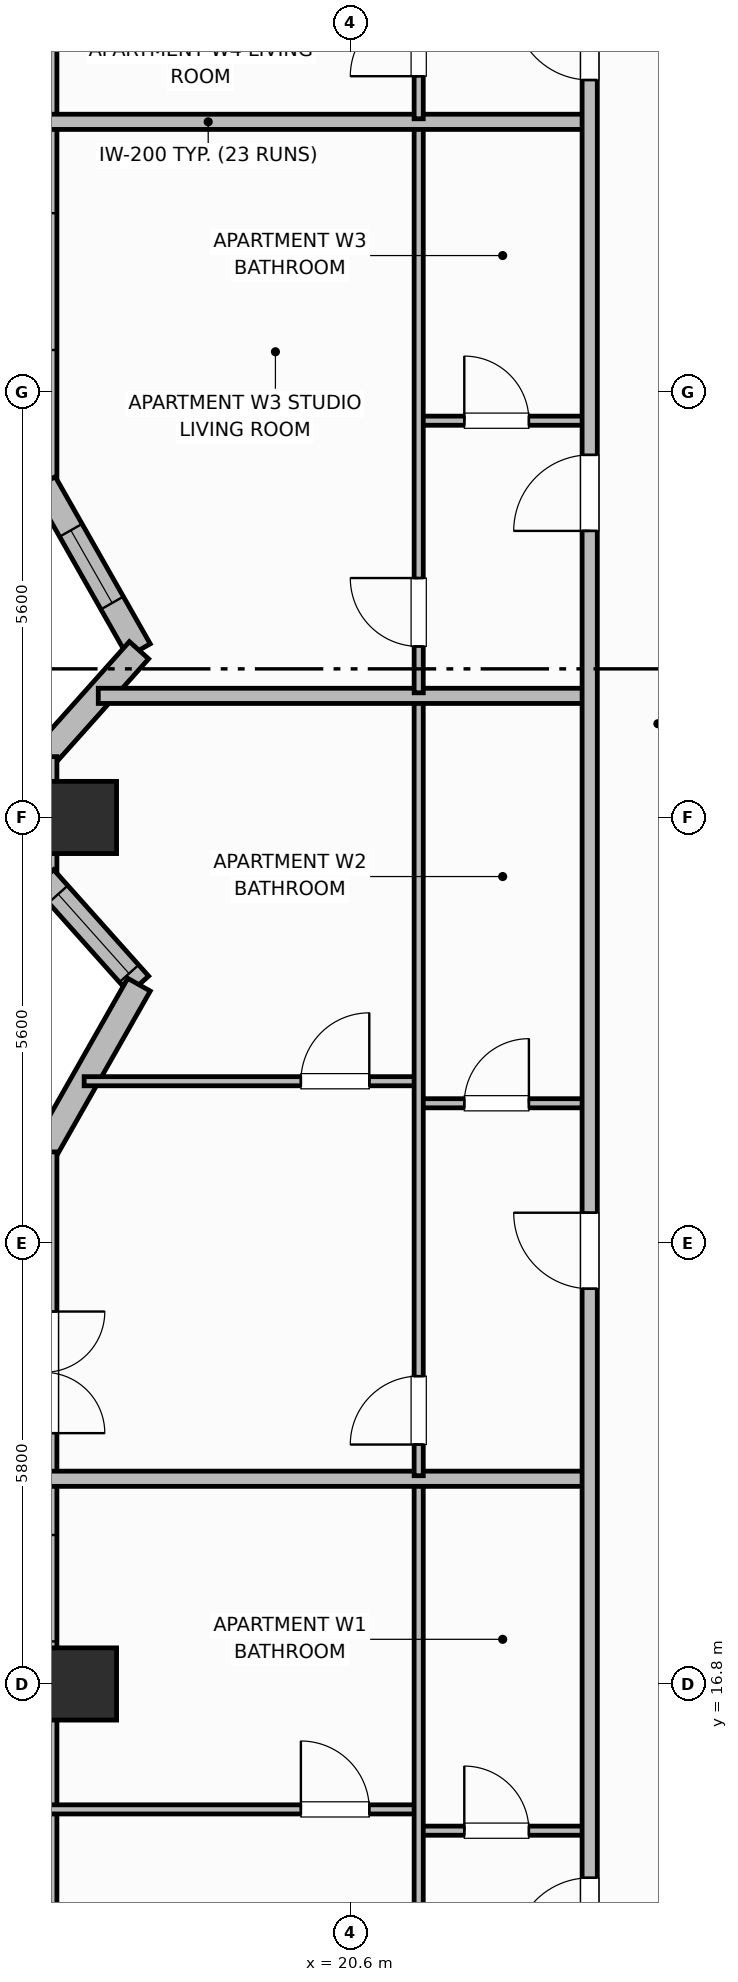
"""IFC4 building model, lengths in metres.
Left out: names, types, materials, properties, quantities, classifications, styles, units other than length and angle.
Written with IfcOpenShell. Run it as: python <this file> out.ifc"""

import sys

from ifc_helpers import new_model, si_unit, direction, frame, frame_2d, origin, origin_2d, place, context, subcontext, project, spatial, rectangle, extrude, element, fill, save


model = new_model("IFC4")
c1 = context("Model", 3, precision=1e-05, world=origin(), true_north=direction((0.0, 1.0)))
c2 = subcontext(c1, "Body", "Model", "MODEL_VIEW")
j1 = project(units=[si_unit("LENGTHUNIT", "METRE"), si_unit("PLANEANGLEUNIT", "RADIAN")], contexts=[c1])
p1 = place(None, origin())
s1 = spatial("IfcSite", under=j1, at=p1, CompositionType="ELEMENT")
p2 = place(p1, origin())
s2 = spatial("IfcBuilding", under=s1, at=p2, CompositionType="ELEMENT")
p3 = place(p2, frame((0.0, 0.0, 166.3)))
s3 = spatial("IfcBuildingStorey", under=s2, at=p3, CompositionType="ELEMENT", Elevation=166.3)
for number, where, z_axis, x_axis in (
    (1, (17.05, 16.8, 0.0), (0.0, 0.0, 1.0), (1.0, 0.0, 0.0)),
    (2, (17.05, 28.2, 0.0), (0.0, 0.0, 1.0), (1.0, 0.0, 0.0)),
):
    element("IfcColumn", number, at=place(p3, frame(where, z_axis=z_axis, x_axis=x_axis)), inside=s3, PredefinedType="COLUMN", context=c2, shape_type="SweptSolid", body=[
        extrude(rectangle(XDim=0.95, YDim=0.95, at=origin_2d()), origin(), (0.0, 0.0, 1.0), 3.7),
    ])
p4 = place(p3, frame((16.57, 45.9, 0.0), z_axis=(0.0, 0.0, 1.0), x_axis=(0.0, -1.0, 0.0)))
e3 = element("IfcWall", 3, at=p4, inside=s3, PredefinedType="SOLIDWALL", context=c2, shape_type="SweptSolid", body=[
    extrude(rectangle(XDim=13.3, YDim=0.34, at=frame_2d((6.65, 0.0))), origin(), (0.0, 0.0, 1.0), 2.72),
])
p5 = place(p4, frame((1.75, 0.0, 0.75)))
e4 = element("IfcOpeningElement", 4, at=p5, cuts=e3, PredefinedType="OPENING", context=c2, shape_type="SweptSolid", body=[
    extrude(rectangle(XDim=1.8, YDim=1.85, at=frame_2d((0.9, 0.925))), frame((0.0, 0.18, 0.0), z_axis=(0.0, -1.0, 0.0), x_axis=(1.0, 0.0, 0.0)), (0.0, 0.0, 1.0), 0.36),
])
p6 = place(p4, frame((9.75, 0.0, 0.75)))
e5 = element("IfcOpeningElement", 5, at=p6, cuts=e3, PredefinedType="OPENING", context=c2, shape_type="SweptSolid", body=[
    extrude(rectangle(XDim=1.8, YDim=1.85, at=frame_2d((0.9, 0.925))), frame((0.0, 0.18, 0.0), z_axis=(0.0, -1.0, 0.0), x_axis=(1.0, 0.0, 0.0)), (0.0, 0.0, 1.0), 0.36),
])
p7 = place(p3, frame((16.57, 32.6, 0.0), z_axis=(0.0, 0.0, 1.0), x_axis=(0.493976255291, -0.869475393101, 0.0)))
e6 = element("IfcWall", 6, at=p7, inside=s3, PredefinedType="SOLIDWALL", context=c2, shape_type="SweptSolid", body=[
    extrude(rectangle(XDim=2.531, YDim=0.34, at=frame_2d((1.265, 0.0))), origin(), (0.0, 0.0, 1.0), 2.72),
])
p8 = place(p7, frame((0.715, 0.0, 0.91)))
e7 = element("IfcOpeningElement", 7, at=p8, cuts=e6, PredefinedType="OPENING", context=c2, shape_type="SweptSolid", body=[
    extrude(rectangle(XDim=1.1, YDim=1.65, at=frame_2d((0.55, 0.825))), frame((0.0, 0.18, 0.0), z_axis=(0.0, -1.0, 0.0), x_axis=(1.0, 0.0, 0.0)), (0.0, 0.0, 1.0), 0.36),
])
p9 = place(p3, frame((17.82, 30.4, 0.0), z_axis=(0.0, 0.0, 1.0), x_axis=(-0.666041619974, -0.74591457987, 0.0)))
e8 = element("IfcWall", 8, at=p9, inside=s3, PredefinedType="SOLIDWALL", context=c2, shape_type="SweptSolid", body=[
    extrude(rectangle(XDim=1.877, YDim=0.34, at=frame_2d((0.938, 0.0))), origin(), (0.0, 0.0, 1.0), 2.72),
])
p10 = place(p3, frame((16.57, 29.0, 0.0), z_axis=(0.0, 0.0, 1.0), x_axis=(0.0, -1.0, 0.0)))
e9 = element("IfcWall", 9, at=p10, inside=s3, PredefinedType="SOLIDWALL", context=c2, shape_type="SweptSolid", body=[
    extrude(rectangle(XDim=1.6, YDim=0.34, at=frame_2d((0.8, 0.0))), origin(), (0.0, 0.0, 1.0), 2.72),
])
p11 = place(p3, frame((16.57, 27.4, 0.0), z_axis=(0.0, 0.0, 1.0), x_axis=(0.666041619974, -0.74591457987, 0.0)))
e10 = element("IfcWall", 10, at=p11, inside=s3, PredefinedType="SOLIDWALL", context=c2, shape_type="SweptSolid", body=[
    extrude(rectangle(XDim=1.877, YDim=0.34, at=frame_2d((0.938, 0.0))), origin(), (0.0, 0.0, 1.0), 2.72),
])
p12 = place(p11, frame((0.28, 0.0, 0.71)))
e11 = element("IfcOpeningElement", 11, at=p12, cuts=e10, PredefinedType="OPENING", context=c2, shape_type="SweptSolid", body=[
    extrude(rectangle(XDim=1.4, YDim=1.85, at=frame_2d((0.7, 0.925))), frame((0.0, 0.18, 0.0), z_axis=(0.0, -1.0, 0.0), x_axis=(1.0, 0.0, 0.0)), (0.0, 0.0, 1.0), 0.36),
])
p13 = place(p3, frame((17.82, 26.0, 0.0), z_axis=(0.0, 0.0, 1.0), x_axis=(-0.494017696272, -0.869451847873, 0.0)))
e12 = element("IfcWall", 12, at=p13, inside=s3, PredefinedType="SOLIDWALL", context=c2, shape_type="SweptSolid", body=[
    extrude(rectangle(XDim=2.53, YDim=0.34, at=frame_2d((1.265, 0.0))), origin(), (0.0, 0.0, 1.0), 2.72),
])
p14 = place(p3, frame((16.57, 23.8, 0.0), z_axis=(0.0, 0.0, 1.0), x_axis=(0.0, -1.0, 0.0)))
e13 = element("IfcWall", 13, at=p14, inside=s3, PredefinedType="SOLIDWALL", context=c2, shape_type="SweptSolid", body=[
    extrude(rectangle(XDim=13.3, YDim=0.34, at=frame_2d((6.65, 0.0))), origin(), (0.0, 0.0, 1.0), 2.72),
])
p15 = place(p14, frame((2.1, 0.0, 0.0)))
e14 = element("IfcOpeningElement", 14, at=p15, cuts=e13, PredefinedType="OPENING", context=c2, shape_type="SweptSolid", body=[
    extrude(rectangle(XDim=1.6, YDim=2.1, at=frame_2d((0.8, 1.05))), frame((0.0, 0.18, 0.0), z_axis=(0.0, -1.0, 0.0), x_axis=(1.0, 0.0, 0.0)), (0.0, 0.0, 1.0), 0.36),
])
p16 = place(p14, frame((5.04, 0.0, 0.71)))
e15 = element("IfcOpeningElement", 15, at=p16, cuts=e13, PredefinedType="OPENING", context=c2, shape_type="SweptSolid", body=[
    extrude(rectangle(XDim=1.4, YDim=1.85, at=frame_2d((0.7, 0.925))), frame((0.0, 0.18, 0.0), z_axis=(0.0, -1.0, 0.0), x_axis=(1.0, 0.0, 0.0)), (0.0, 0.0, 1.0), 0.36),
])
p17 = place(p14, frame((10.35, 0.0, 0.7)))
e16 = element("IfcOpeningElement", 16, at=p17, cuts=e13, PredefinedType="OPENING", context=c2, shape_type="SweptSolid", body=[
    extrude(rectangle(XDim=1.6, YDim=1.9, at=frame_2d((0.8, 0.95))), frame((0.0, 0.18, 0.0), z_axis=(0.0, -1.0, 0.0), x_axis=(1.0, 0.0, 0.0)), (0.0, 0.0, 1.0), 0.36),
])
p18 = place(p3, frame((21.5, 14.87, 0.0), z_axis=(0.0, 0.0, 1.0), x_axis=(1.0, 0.0, 0.0)))
e17 = element("IfcWall", 17, at=p18, inside=s3, PredefinedType="PARTITIONING", context=c2, shape_type="SweptSolid", body=[
    extrude(rectangle(XDim=2.25, YDim=0.12, at=frame_2d((1.125, 0.0))), origin(), (0.0, 0.0, 1.0), 2.55),
])
p19 = place(p18, frame((0.6, 0.0, 0.0)))
e18 = element("IfcOpeningElement", 18, at=p19, cuts=e17, PredefinedType="OPENING", context=c2, shape_type="SweptSolid", body=[
    extrude(rectangle(XDim=0.85, YDim=2.1, at=frame_2d((0.425, 1.05))), frame((0.0, 0.07, 0.0), z_axis=(0.0, -1.0, 0.0), x_axis=(1.0, 0.0, 0.0)), (0.0, 0.0, 1.0), 0.14),
])
p20 = place(p3, frame((16.57, 15.15, 0.0), z_axis=(0.0, 0.0, 1.0), x_axis=(1.0, 0.0, 0.0)))
e19 = element("IfcWall", 19, at=p20, inside=s3, PredefinedType="PARTITIONING", context=c2, shape_type="SweptSolid", body=[
    extrude(rectangle(XDim=4.93, YDim=0.12, at=frame_2d((2.465, 0.0))), origin(), (0.0, 0.0, 1.0), 2.55),
])
p21 = place(p20, frame((3.38, 0.0, 0.0)))
e20 = element("IfcOpeningElement", 20, at=p21, cuts=e19, PredefinedType="OPENING", context=c2, shape_type="SweptSolid", body=[
    extrude(rectangle(XDim=0.9, YDim=2.1, at=frame_2d((0.45, 1.05))), frame((0.0, 0.07, 0.0), z_axis=(0.0, -1.0, 0.0), x_axis=(1.0, 0.0, 0.0)), (0.0, 0.0, 1.0), 0.14),
])
p22 = place(p3, frame((21.5, 10.64, 0.0), z_axis=(0.0, 0.0, 1.0), x_axis=(0.0, 1.0, 0.0)))
e21 = element("IfcWall", 21, at=p22, inside=s3, PredefinedType="PARTITIONING", context=c2, shape_type="SweptSolid", body=[
    extrude(rectangle(XDim=8.82, YDim=0.12, at=frame_2d((4.41, 0.0))), origin(), (0.0, 0.0, 1.0), 2.55),
])
p23 = place(p22, frame((0.41, 0.0, 0.0)))
e22 = element("IfcOpeningElement", 22, at=p23, cuts=e21, PredefinedType="OPENING", context=c2, shape_type="SweptSolid", body=[
    extrude(rectangle(XDim=0.9, YDim=2.1, at=frame_2d((0.45, 1.05))), frame((0.0, 0.07, 0.0), z_axis=(0.0, -1.0, 0.0), x_axis=(1.0, 0.0, 0.0)), (0.0, 0.0, 1.0), 0.14),
])
p24 = place(p3, frame((16.57, 19.5, 0.0), z_axis=(0.0, 0.0, 1.0), x_axis=(1.0, 0.0, 0.0)))
e23 = element("IfcWall", 23, at=p24, inside=s3, PredefinedType="PARTITIONING", context=c2, shape_type="SweptSolid", body=[
    extrude(rectangle(XDim=7.18, YDim=0.2, at=frame_2d((3.59, 0.0))), origin(), (0.0, 0.0, 1.0), 2.55),
])
p25 = place(p3, frame((21.5, 24.44, 0.0), z_axis=(0.0, 0.0, 1.0), x_axis=(1.0, 0.0, 0.0)))
e24 = element("IfcWall", 24, at=p25, inside=s3, PredefinedType="PARTITIONING", context=c2, shape_type="SweptSolid", body=[
    extrude(rectangle(XDim=2.25, YDim=0.12, at=frame_2d((1.125, 0.0))), origin(), (0.0, 0.0, 1.0), 2.55),
])
p26 = place(p25, frame((0.6, 0.0, 0.0)))
e25 = element("IfcOpeningElement", 25, at=p26, cuts=e24, PredefinedType="OPENING", context=c2, shape_type="SweptSolid", body=[
    extrude(rectangle(XDim=0.85, YDim=2.1, at=frame_2d((0.425, 1.05))), frame((0.0, 0.07, 0.0), z_axis=(0.0, -1.0, 0.0), x_axis=(1.0, 0.0, 0.0)), (0.0, 0.0, 1.0), 0.14),
])
p27 = place(p3, frame((17.098, 24.73, 0.0), z_axis=(0.0, 0.0, 1.0), x_axis=(1.0, 0.0, 0.0)))
e26 = element("IfcWall", 26, at=p27, inside=s3, PredefinedType="PARTITIONING", context=c2, shape_type="SweptSolid", body=[
    extrude(rectangle(XDim=4.402, YDim=0.12, at=frame_2d((2.201, 0.0))), origin(), (0.0, 0.0, 1.0), 2.55),
])
p28 = place(p27, frame((2.852, 0.0, 0.0)))
e27 = element("IfcOpeningElement", 27, at=p28, cuts=e26, PredefinedType="OPENING", context=c2, shape_type="SweptSolid", body=[
    extrude(rectangle(XDim=0.9, YDim=2.1, at=frame_2d((0.45, 1.05))), frame((0.0, 0.07, 0.0), z_axis=(0.0, -1.0, 0.0), x_axis=(1.0, 0.0, 0.0)), (0.0, 0.0, 1.0), 0.14),
])
p29 = place(p3, frame((21.5, 19.54, 0.0), z_axis=(0.0, 0.0, 1.0), x_axis=(0.0, 1.0, 0.0)))
e28 = element("IfcWall", 28, at=p29, inside=s3, PredefinedType="PARTITIONING", context=c2, shape_type="SweptSolid", body=[
    extrude(rectangle(XDim=10.22, YDim=0.12, at=frame_2d((5.11, 0.0))), origin(), (0.0, 0.0, 1.0), 2.55),
])
p30 = place(p29, frame((0.41, 0.0, 0.0)))
e29 = element("IfcOpeningElement", 29, at=p30, cuts=e28, PredefinedType="OPENING", context=c2, shape_type="SweptSolid", body=[
    extrude(rectangle(XDim=0.9, YDim=2.1, at=frame_2d((0.45, 1.05))), frame((0.0, 0.07, 0.0), z_axis=(0.0, -1.0, 0.0), x_axis=(1.0, 0.0, 0.0)), (0.0, 0.0, 1.0), 0.14),
])
p31 = place(p3, frame((17.284, 29.8, 0.0), z_axis=(0.0, 0.0, 1.0), x_axis=(1.0, 0.0, 0.0)))
e30 = element("IfcWall", 30, at=p31, inside=s3, PredefinedType="PARTITIONING", context=c2, shape_type="SweptSolid", body=[
    extrude(rectangle(XDim=6.466, YDim=0.2, at=frame_2d((3.233, 0.0))), origin(), (0.0, 0.0, 1.0), 2.55),
])
p32 = place(p3, frame((21.5, 33.42, 0.0), z_axis=(0.0, 0.0, 1.0), x_axis=(1.0, 0.0, 0.0)))
e31 = element("IfcWall", 31, at=p32, inside=s3, PredefinedType="PARTITIONING", context=c2, shape_type="SweptSolid", body=[
    extrude(rectangle(XDim=2.25, YDim=0.12, at=frame_2d((1.125, 0.0))), origin(), (0.0, 0.0, 1.0), 2.55),
])
p33 = place(p32, frame((0.6, 0.0, 0.0)))
e32 = element("IfcOpeningElement", 32, at=p33, cuts=e31, PredefinedType="OPENING", context=c2, shape_type="SweptSolid", body=[
    extrude(rectangle(XDim=0.85, YDim=2.1, at=frame_2d((0.425, 1.05))), frame((0.0, 0.07, 0.0), z_axis=(0.0, -1.0, 0.0), x_axis=(1.0, 0.0, 0.0)), (0.0, 0.0, 1.0), 0.14),
])
p34 = place(p3, frame((21.5, 29.84, 0.0), z_axis=(0.0, 0.0, 1.0), x_axis=(0.0, 1.0, 0.0)))
e33 = element("IfcWall", 33, at=p34, inside=s3, PredefinedType="PARTITIONING", context=c2, shape_type="SweptSolid", body=[
    extrude(rectangle(XDim=7.472, YDim=0.12, at=frame_2d((3.736, 0.0))), origin(), (0.0, 0.0, 1.0), 2.55),
])
p35 = place(p34, frame((0.61, 0.0, 0.0)))
e34 = element("IfcOpeningElement", 34, at=p35, cuts=e33, PredefinedType="OPENING", context=c2, shape_type="SweptSolid", body=[
    extrude(rectangle(XDim=0.9, YDim=2.1, at=frame_2d((0.45, 1.05))), frame((0.0, 0.07, 0.0), z_axis=(0.0, -1.0, 0.0), x_axis=(1.0, 0.0, 0.0)), (0.0, 0.0, 1.0), 0.14),
])
p36 = place(p3, frame((16.57, 37.352, 0.0), z_axis=(0.0, 0.0, 1.0), x_axis=(1.0, 0.0, 0.0)))
e35 = element("IfcWall", 35, at=p36, inside=s3, PredefinedType="PARTITIONING", context=c2, shape_type="SweptSolid", body=[
    extrude(rectangle(XDim=7.18, YDim=0.2, at=frame_2d((3.59, 0.0))), origin(), (0.0, 0.0, 1.0), 2.55),
])
p37 = place(p3, frame((21.5, 37.392, 0.0), z_axis=(0.0, 0.0, 1.0), x_axis=(0.0, 1.0, 0.0)))
e36 = element("IfcWall", 36, at=p37, inside=s3, PredefinedType="PARTITIONING", context=c2, shape_type="SweptSolid", body=[
    extrude(rectangle(XDim=8.368, YDim=0.12, at=frame_2d((4.184, 0.0))), origin(), (0.0, 0.0, 1.0), 2.55),
])
p38 = place(p37, frame((0.56, 0.0, 0.0)))
e37 = element("IfcOpeningElement", 37, at=p38, cuts=e36, PredefinedType="OPENING", context=c2, shape_type="SweptSolid", body=[
    extrude(rectangle(XDim=0.9, YDim=2.1, at=frame_2d((0.45, 1.05))), frame((0.0, 0.07, 0.0), z_axis=(0.0, -1.0, 0.0), x_axis=(1.0, 0.0, 0.0)), (0.0, 0.0, 1.0), 0.14),
])
p39 = place(p3, frame((23.75, 10.6, 0.0), z_axis=(0.0, 0.0, 1.0), x_axis=(0.0, 1.0, 0.0)))
e38 = element("IfcWall", 38, at=p39, inside=s3, PredefinedType="PARTITIONING", context=c2, shape_type="SweptSolid", body=[
    extrude(rectangle(XDim=35.2, YDim=0.2, at=frame_2d((17.6, 0.0))), origin(), (0.0, 0.0, 1.0), 2.55),
])
p40 = place(p39, frame((2.65, 0.0, 0.0)))
e39 = element("IfcOpeningElement", 39, at=p40, cuts=e38, PredefinedType="OPENING", context=c2, shape_type="SweptSolid", body=[
    extrude(rectangle(XDim=1.0, YDim=2.15, at=frame_2d((0.5, 1.075))), frame((0.0, 0.11, 0.0), z_axis=(0.0, -1.0, 0.0), x_axis=(1.0, 0.0, 0.0)), (0.0, 0.0, 1.0), 0.22),
])
p41 = place(p39, frame((11.4, 0.0, 0.0)))
e40 = element("IfcOpeningElement", 40, at=p41, cuts=e38, PredefinedType="OPENING", context=c2, shape_type="SweptSolid", body=[
    extrude(rectangle(XDim=1.0, YDim=2.15, at=frame_2d((0.5, 1.075))), frame((0.0, 0.11, 0.0), z_axis=(0.0, -1.0, 0.0), x_axis=(1.0, 0.0, 0.0)), (0.0, 0.0, 1.0), 0.22),
])
p42 = place(p39, frame((21.37, 0.0, 0.0)))
e41 = element("IfcOpeningElement", 41, at=p42, cuts=e38, PredefinedType="OPENING", context=c2, shape_type="SweptSolid", body=[
    extrude(rectangle(XDim=1.0, YDim=2.15, at=frame_2d((0.5, 1.075))), frame((0.0, 0.11, 0.0), z_axis=(0.0, -1.0, 0.0), x_axis=(1.0, 0.0, 0.0)), (0.0, 0.0, 1.0), 0.22),
])
p43 = place(p39, frame((27.302, 0.0, 0.0)))
e42 = element("IfcOpeningElement", 42, at=p43, cuts=e38, PredefinedType="OPENING", context=c2, shape_type="SweptSolid", body=[
    extrude(rectangle(XDim=1.0, YDim=2.15, at=frame_2d((0.5, 1.075))), frame((0.0, 0.11, 0.0), z_axis=(0.0, -1.0, 0.0), x_axis=(1.0, 0.0, 0.0)), (0.0, 0.0, 1.0), 0.22),
])
p44 = place(p8, origin())
e43 = element("IfcWindow", 43, at=p44, inside=s3, PartitioningType="SINGLE_PANEL", PredefinedType="WINDOW", context=c2, shape_type="SweptSolid", body=[
    extrude(rectangle(XDim=1.1, YDim=1.65, at=frame_2d((0.55, 0.825))), frame((0.0, 0.03, 0.0), z_axis=(0.0, -1.0, 0.0), x_axis=(1.0, 0.0, 0.0)), (0.0, 0.0, 1.0), 0.06),
])
fill(e7, e43)
p45 = place(p12, origin())
e44 = element("IfcWindow", 44, at=p45, inside=s3, PartitioningType="SINGLE_PANEL", PredefinedType="WINDOW", context=c2, shape_type="SweptSolid", body=[
    extrude(rectangle(XDim=1.4, YDim=1.85, at=frame_2d((0.7, 0.925))), frame((0.0, 0.03, 0.0), z_axis=(0.0, -1.0, 0.0), x_axis=(1.0, 0.0, 0.0)), (0.0, 0.0, 1.0), 0.06),
])
fill(e11, e44)
p46 = place(p19, origin())
e45 = element("IfcDoor", 45, at=p46, inside=s3, OperationType="SINGLE_SWING_LEFT", PredefinedType="DOOR", context=c2, shape_type="SweptSolid", body=[
    extrude(rectangle(XDim=0.85, YDim=2.1, at=frame_2d((0.425, 1.05))), frame((0.0, 0.025, 0.0), z_axis=(0.0, -1.0, 0.0), x_axis=(1.0, 0.0, 0.0)), (0.0, 0.0, 1.0), 0.05),
])
fill(e18, e45)
p47 = place(p21, origin())
e46 = element("IfcDoor", 46, at=p47, inside=s3, OperationType="SINGLE_SWING_LEFT", PredefinedType="DOOR", context=c2, shape_type="SweptSolid", body=[
    extrude(rectangle(XDim=0.9, YDim=2.1, at=frame_2d((0.45, 1.05))), frame((0.0, 0.025, 0.0), z_axis=(0.0, -1.0, 0.0), x_axis=(1.0, 0.0, 0.0)), (0.0, 0.0, 1.0), 0.05),
])
fill(e20, e46)
p48 = place(p26, origin())
e47 = element("IfcDoor", 47, at=p48, inside=s3, OperationType="SINGLE_SWING_RIGHT", PredefinedType="DOOR", context=c2, shape_type="SweptSolid", body=[
    extrude(rectangle(XDim=0.85, YDim=2.1, at=frame_2d((0.425, 1.05))), frame((0.0, 0.025, 0.0), z_axis=(0.0, -1.0, 0.0), x_axis=(1.0, 0.0, 0.0)), (0.0, 0.0, 1.0), 0.05),
])
fill(e25, e47)
p49 = place(p28, origin())
e48 = element("IfcDoor", 48, at=p49, inside=s3, OperationType="SINGLE_SWING_RIGHT", PredefinedType="DOOR", context=c2, shape_type="SweptSolid", body=[
    extrude(rectangle(XDim=0.9, YDim=2.1, at=frame_2d((0.45, 1.05))), frame((0.0, 0.025, 0.0), z_axis=(0.0, -1.0, 0.0), x_axis=(1.0, 0.0, 0.0)), (0.0, 0.0, 1.0), 0.05),
])
fill(e27, e48)
p50 = place(p30, origin())
e49 = element("IfcDoor", 49, at=p50, inside=s3, OperationType="SINGLE_SWING_LEFT", PredefinedType="DOOR", context=c2, shape_type="SweptSolid", body=[
    extrude(rectangle(XDim=0.9, YDim=2.1, at=frame_2d((0.45, 1.05))), frame((0.0, 0.025, 0.0), z_axis=(0.0, -1.0, 0.0), x_axis=(1.0, 0.0, 0.0)), (0.0, 0.0, 1.0), 0.05),
])
fill(e29, e49)
p51 = place(p33, origin())
e50 = element("IfcDoor", 50, at=p51, inside=s3, OperationType="SINGLE_SWING_LEFT", PredefinedType="DOOR", context=c2, shape_type="SweptSolid", body=[
    extrude(rectangle(XDim=0.85, YDim=2.1, at=frame_2d((0.425, 1.05))), frame((0.0, 0.025, 0.0), z_axis=(0.0, -1.0, 0.0), x_axis=(1.0, 0.0, 0.0)), (0.0, 0.0, 1.0), 0.05),
])
fill(e32, e50)
p52 = place(p35, origin())
e51 = element("IfcDoor", 51, at=p52, inside=s3, OperationType="SINGLE_SWING_RIGHT", PredefinedType="DOOR", context=c2, shape_type="SweptSolid", body=[
    extrude(rectangle(XDim=0.9, YDim=2.1, at=frame_2d((0.45, 1.05))), frame((0.0, 0.025, 0.0), z_axis=(0.0, -1.0, 0.0), x_axis=(1.0, 0.0, 0.0)), (0.0, 0.0, 1.0), 0.05),
])
fill(e34, e51)
p53 = place(p38, origin())
e52 = element("IfcDoor", 52, at=p53, inside=s3, OperationType="SINGLE_SWING_LEFT", PredefinedType="DOOR", context=c2, shape_type="SweptSolid", body=[
    extrude(rectangle(XDim=0.9, YDim=2.1, at=frame_2d((0.45, 1.05))), frame((0.0, 0.025, 0.0), z_axis=(0.0, -1.0, 0.0), x_axis=(1.0, 0.0, 0.0)), (0.0, 0.0, 1.0), 0.05),
])
fill(e37, e52)
p54 = place(p40, origin())
e53 = element("IfcDoor", 53, at=p54, inside=s3, OperationType="SINGLE_SWING_LEFT", PredefinedType="DOOR", context=c2, shape_type="SweptSolid", body=[
    extrude(rectangle(XDim=1.0, YDim=2.15, at=frame_2d((0.5, 1.075))), frame((0.0, 0.025, 0.0), z_axis=(0.0, -1.0, 0.0), x_axis=(1.0, 0.0, 0.0)), (0.0, 0.0, 1.0), 0.05),
])
fill(e39, e53)
p55 = place(p41, origin())
e54 = element("IfcDoor", 54, at=p55, inside=s3, OperationType="SINGLE_SWING_RIGHT", PredefinedType="DOOR", context=c2, shape_type="SweptSolid", body=[
    extrude(rectangle(XDim=1.0, YDim=2.15, at=frame_2d((0.5, 1.075))), frame((0.0, 0.025, 0.0), z_axis=(0.0, -1.0, 0.0), x_axis=(1.0, 0.0, 0.0)), (0.0, 0.0, 1.0), 0.05),
])
fill(e40, e54)
p56 = place(p42, origin())
e55 = element("IfcDoor", 55, at=p56, inside=s3, OperationType="SINGLE_SWING_LEFT", PredefinedType="DOOR", context=c2, shape_type="SweptSolid", body=[
    extrude(rectangle(XDim=1.0, YDim=2.15, at=frame_2d((0.5, 1.075))), frame((0.0, 0.025, 0.0), z_axis=(0.0, -1.0, 0.0), x_axis=(1.0, 0.0, 0.0)), (0.0, 0.0, 1.0), 0.05),
])
fill(e41, e55)
p57 = place(p43, origin())
e56 = element("IfcDoor", 56, at=p57, inside=s3, OperationType="SINGLE_SWING_RIGHT", PredefinedType="DOOR", context=c2, shape_type="SweptSolid", body=[
    extrude(rectangle(XDim=1.0, YDim=2.15, at=frame_2d((0.5, 1.075))), frame((0.0, 0.025, 0.0), z_axis=(0.0, -1.0, 0.0), x_axis=(1.0, 0.0, 0.0)), (0.0, 0.0, 1.0), 0.05),
])
fill(e42, e56)
save(model, sys.argv[1])
